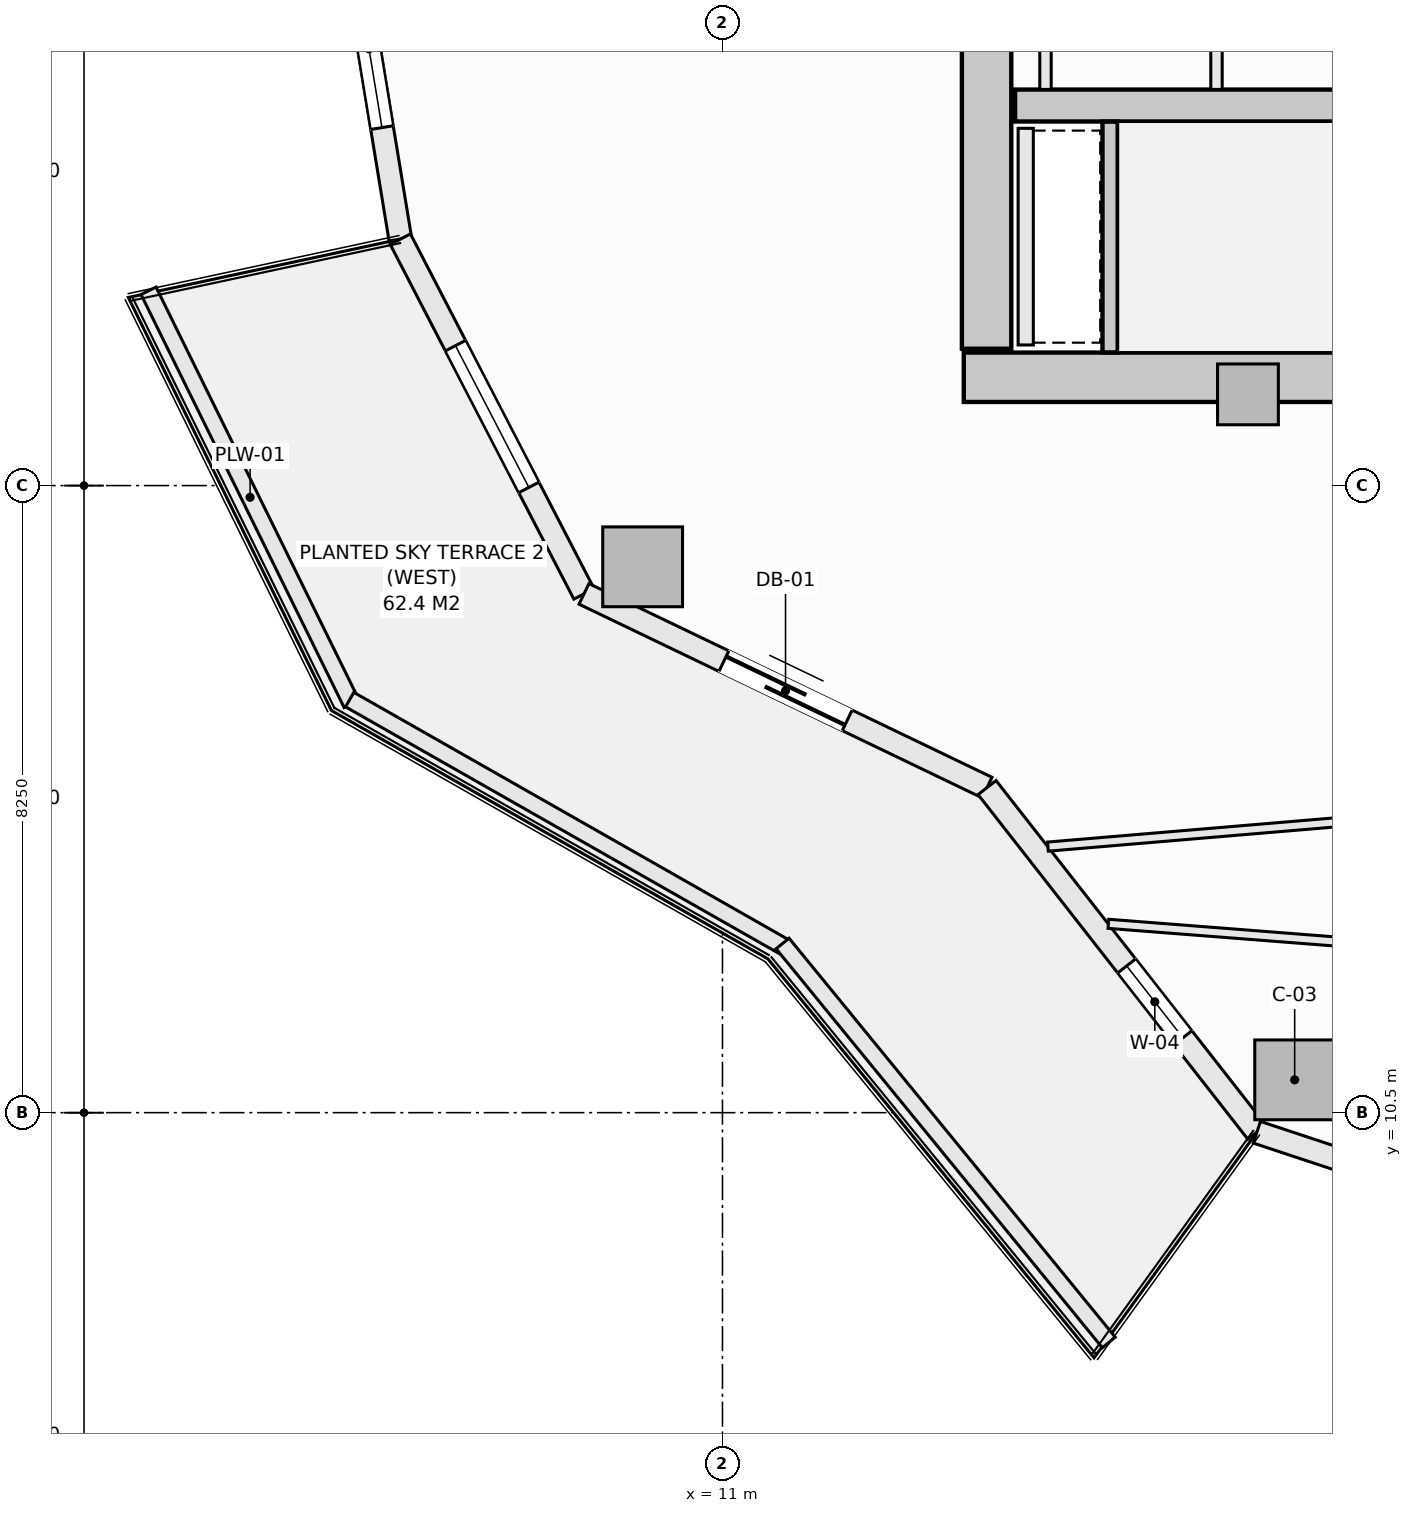
"""IFC4 building model, lengths in metres.
Left out: names, types, materials, properties, quantities, classifications, styles, units other than length and angle.
Written with IfcOpenShell. Run it as: python <this file> out.ifc"""

import sys

from ifc_helpers import new_model, si_unit, direction, frame, frame_2d, origin, origin_2d, place, context, subcontext, project, spatial, rectangle, extrude, element, fill, save


model = new_model("IFC4")
c1 = context("Model", 3, precision=1e-05, world=origin(), true_north=direction((0.0, 1.0)))
c2 = subcontext(c1, "Body", "Model", "MODEL_VIEW")
j1 = project(units=[si_unit("LENGTHUNIT", "METRE"), si_unit("PLANEANGLEUNIT", "RADIAN")], contexts=[c1])
p1 = place(None, origin())
s1 = spatial("IfcSite", under=j1, at=p1, CompositionType="ELEMENT")
p2 = place(p1, origin())
s2 = spatial("IfcBuilding", under=s1, at=p2, CompositionType="ELEMENT")
p3 = place(p2, frame((0.0, 0.0, 135.9)))
s3 = spatial("IfcBuildingStorey", under=s2, at=p3, CompositionType="ELEMENT", Elevation=135.9)
p4 = place(p3, frame((14.175, 20.175, -0.27), z_axis=(0.0, 0.0, 1.0), x_axis=(1.0, 0.0, 0.0)))
e1 = element("IfcWall", 1, at=p4, inside=s3, PredefinedType="SHEAR", context=c2, shape_type="SweptSolid", body=[
    extrude(rectangle(XDim=13.65, YDim=0.65, at=frame_2d((6.825, 0.0))), origin(), (0.0, 0.0, 1.0), 3.4),
])
p5 = place(p3, frame((14.475, 20.55, -0.27), z_axis=(0.0, 0.0, 1.0), x_axis=(0.0, 1.0, 0.0)))
e2 = element("IfcWall", 2, at=p5, inside=s3, PredefinedType="SHEAR", context=c2, shape_type="SweptSolid", body=[
    extrude(rectangle(XDim=12.9, YDim=0.65, at=frame_2d((6.45, 0.0))), origin(), (0.0, 0.0, 1.0), 3.4),
])
p6 = place(p3, frame((14.85, 23.75, -0.27), z_axis=(0.0, 0.0, 1.0), x_axis=(1.0, 0.0, 0.0)))
e3 = element("IfcWall", 3, at=p6, inside=s3, PredefinedType="SHEAR", context=c2, shape_type="SweptSolid", body=[
    extrude(rectangle(XDim=7.3, YDim=0.42, at=frame_2d((3.65, 0.0))), origin(), (0.0, 0.0, 1.0), 3.4),
])
for number, where, z_axis, x_axis in (
    (4, (9.95, 17.681, -0.27), (0.0, 0.0, 1.0), (1.0, 0.0, 0.0)),
    (5, (18.529, 10.932, -0.27), (0.0, 0.0, 1.0), (1.0, 0.0, 0.0)),
):
    element("IfcColumn", number, at=place(p3, frame(where, z_axis=z_axis, x_axis=x_axis)), inside=s3, PredefinedType="COLUMN", context=c2, shape_type="SweptSolid", body=[
        extrude(rectangle(XDim=1.05, YDim=1.05, at=origin_2d()), origin(), (0.0, 0.0, 1.0), 3.4),
    ])
p7 = place(p3, frame((17.914, 19.95, -0.27), z_axis=(0.0, 0.0, 1.0), x_axis=(1.0, 0.0, 0.0)))
e6 = element("IfcColumn", 6, at=p7, inside=s3, PredefinedType="PILASTER", context=c2, shape_type="SweptSolid", body=[
    extrude(rectangle(XDim=0.8, YDim=0.8, at=origin_2d()), origin(), (0.0, 0.0, 1.0), 3.4),
])
p8 = place(p3, frame((5.938, 27.0, 0.0), z_axis=(0.0, 0.0, 1.0), x_axis=(0.162393944769, -0.986726003864, 0.0)))
e7 = element("IfcWall", 7, at=p8, inside=s3, PredefinedType="SOLIDWALL", context=c2, shape_type="SweptSolid", body=[
    extrude(rectangle(XDim=5.075, YDim=0.3, at=frame_2d((2.538, 0.0))), origin(), (0.0, 0.0, 1.0), 2.653),
])
p9 = place(p8, frame((1.488, 0.0, 0.74)))
e8 = element("IfcOpeningElement", 8, at=p9, cuts=e7, PredefinedType="OPENING", context=c2, shape_type="SweptSolid", body=[
    extrude(rectangle(XDim=2.1, YDim=1.7, at=frame_2d((1.05, 0.85))), frame((0.0, 0.16, 0.0), z_axis=(0.0, -1.0, 0.0), x_axis=(1.0, 0.0, 0.0)), (0.0, 0.0, 1.0), 0.32),
])
p10 = place(p3, frame((6.762, 21.992, 0.0), z_axis=(0.0, 0.0, 1.0), x_axis=(0.459767899643, -0.888039119892, 0.0)))
e9 = element("IfcWall", 9, at=p10, inside=s3, PredefinedType="SOLIDWALL", context=c2, shape_type="SweptSolid", body=[
    extrude(rectangle(XDim=5.255, YDim=0.3, at=frame_2d((2.628, 0.0))), origin(), (0.0, 0.0, 1.0), 2.653),
])
p11 = place(p10, frame((1.578, 0.0, 0.74)))
e10 = element("IfcOpeningElement", 10, at=p11, cuts=e9, PredefinedType="OPENING", context=c2, shape_type="SweptSolid", body=[
    extrude(rectangle(XDim=2.1, YDim=1.7, at=frame_2d((1.05, 0.85))), frame((0.0, 0.16, 0.0), z_axis=(0.0, -1.0, 0.0), x_axis=(1.0, 0.0, 0.0)), (0.0, 0.0, 1.0), 0.32),
])
p12 = place(p3, frame((9.178, 17.325, 0.0), z_axis=(0.0, 0.0, 1.0), x_axis=(0.901370184739, -0.433049408339, 0.0)))
e11 = element("IfcWall", 11, at=p12, inside=s3, PredefinedType="SOLIDWALL", context=c2, shape_type="SweptSolid", body=[
    extrude(rectangle(XDim=5.884, YDim=0.3, at=frame_2d((2.942, 0.0))), origin(), (0.0, 0.0, 1.0), 2.653),
])
p13 = place(p12, frame((2.042, 0.0, 0.0)))
e12 = element("IfcOpeningElement", 12, at=p13, cuts=e11, PredefinedType="OPENING", context=c2, shape_type="SweptSolid", body=[
    extrude(rectangle(XDim=1.8, YDim=2.25, at=frame_2d((0.9, 1.125))), frame((0.0, 0.16, 0.0), z_axis=(0.0, -1.0, 0.0), x_axis=(1.0, 0.0, 0.0)), (0.0, 0.0, 1.0), 0.32),
])
p14 = place(p3, frame((14.481, 14.777, 0.0), z_axis=(0.0, 0.0, 1.0), x_axis=(0.616435134162, -0.787405693001, 0.0)))
e13 = element("IfcWall", 13, at=p14, inside=s3, PredefinedType="SOLIDWALL", context=c2, shape_type="SweptSolid", body=[
    extrude(rectangle(XDim=5.759, YDim=0.3, at=frame_2d((2.879, 0.0))), origin(), (0.0, 0.0, 1.0), 2.653),
])
p15 = place(p14, frame((2.98, 0.0, 0.72)))
e14 = element("IfcOpeningElement", 14, at=p15, cuts=e13, PredefinedType="OPENING", context=c2, shape_type="SweptSolid", body=[
    extrude(rectangle(XDim=1.2, YDim=1.65, at=frame_2d((0.6, 0.825))), frame((0.0, 0.16, 0.0), z_axis=(0.0, -1.0, 0.0), x_axis=(1.0, 0.0, 0.0)), (0.0, 0.0, 1.0), 0.32),
])
p16 = place(p3, frame((18.031, 10.242, 0.0), z_axis=(0.0, 0.0, 1.0), x_axis=(0.949238009374, -0.314558741032, 0.0)))
e15 = element("IfcWall", 15, at=p16, inside=s3, PredefinedType="SOLIDWALL", context=c2, shape_type="SweptSolid", body=[
    extrude(rectangle(XDim=6.146, YDim=0.3, at=frame_2d((3.073, 0.0))), origin(), (0.0, 0.0, 1.0), 2.653),
])
p17 = place(p16, frame((2.023, 0.0, 0.74)))
e16 = element("IfcOpeningElement", 16, at=p17, cuts=e15, PredefinedType="OPENING", context=c2, shape_type="SweptSolid", body=[
    extrude(rectangle(XDim=2.1, YDim=1.7, at=frame_2d((1.05, 0.85))), frame((0.0, 0.16, 0.0), z_axis=(0.0, -1.0, 0.0), x_axis=(1.0, 0.0, 0.0)), (0.0, 0.0, 1.0), 0.32),
])
p18 = place(p3, frame((3.449, 21.313, 0.0), z_axis=(0.0, 0.0, 1.0), x_axis=(0.441269631716, -0.897374566235, 0.0)))
e17 = element("IfcWall", 17, at=p18, inside=s3, PredefinedType="PARAPET", context=c2, shape_type="SweptSolid", body=[
    extrude(rectangle(XDim=6.056, YDim=0.22, at=frame_2d((3.028, 0.0))), origin(), (0.0, 0.0, 1.0), 0.52),
])
p19 = place(p3, frame((6.095, 15.934, 0.0), z_axis=(0.0, 0.0, 1.0), x_axis=(0.869187658335, -0.494482370361, 0.0)))
e18 = element("IfcWall", 18, at=p19, inside=s3, PredefinedType="PARAPET", context=c2, shape_type="SweptSolid", body=[
    extrude(rectangle(XDim=6.606, YDim=0.22, at=frame_2d((3.303, 0.0))), origin(), (0.0, 0.0, 1.0), 0.52),
])
p20 = place(p3, frame((11.791, 12.726, 0.0), z_axis=(0.0, 0.0, 1.0), x_axis=(0.633002467947, -0.77414977593, 0.0)))
e19 = element("IfcWall", 19, at=p20, inside=s3, PredefinedType="PARAPET", context=c2, shape_type="SweptSolid", body=[
    extrude(rectangle(XDim=6.78, YDim=0.22, at=frame_2d((3.39, 0.0))), origin(), (0.0, 0.0, 1.0), 0.52),
])
p21 = place(p3, frame((16.1, 20.502, -0.27), z_axis=(0.0, 0.0, 1.0), x_axis=(0.0, 1.0, 0.0)))
e20 = element("IfcWall", 20, at=p21, inside=s3, PredefinedType="SHEAR", context=c2, shape_type="SweptSolid", body=[
    extrude(rectangle(XDim=3.036, YDim=0.2, at=frame_2d((1.518, 0.0))), origin(), (0.0, 0.0, 1.0), 3.4),
])
p22 = place(p3, frame((14.99, 20.6, 0.0), z_axis=(0.0, 0.0, 1.0), x_axis=(0.0, 1.0, 0.0)))
e21 = element("IfcWall", 21, at=p22, inside=s3, PredefinedType="SOLIDWALL", context=c2, shape_type="SweptSolid", body=[
    extrude(rectangle(XDim=2.85, YDim=0.2, at=frame_2d((1.425, 0.0))), origin(), (0.0, 0.0, 1.0), 3.13),
])
for number, where, z_axis, x_axis in (
    (22, (15.25, 23.962, 0.0), (0.0, 0.0, 1.0), (0.0, 1.0, 0.0)),
    (23, (17.5, 23.962, 0.0), (0.0, 0.0, 1.0), (0.0, 1.0, 0.0)),
):
    element("IfcWall", number, at=place(p3, frame(where, z_axis=z_axis, x_axis=x_axis)), inside=s3, PredefinedType="PARTITIONING", context=c2, shape_type="SweptSolid", body=[
        extrude(rectangle(XDim=2.106, YDim=0.15, at=frame_2d((1.053, 0.0))), origin(), (0.0, 0.0, 1.0), 3.13),
    ])
p23 = place(p3, frame((15.282, 14.0, 0.0), z_axis=(0.0, 0.0, 1.0), x_axis=(0.996466219822, 0.083994480498, 0.0)))
e24 = element("IfcWall", 24, at=p23, inside=s3, PredefinedType="PARTITIONING", context=c2, shape_type="SweptSolid", body=[
    extrude(rectangle(XDim=8.069, YDim=0.12, at=frame_2d((4.034, 0.0))), origin(), (0.0, 0.0, 1.0), 3.13),
])
p24 = place(p3, frame((16.078, 12.985, 0.0), z_axis=(0.0, 0.0, 1.0), x_axis=(0.996984897733, -0.077595835537, 0.0)))
e25 = element("IfcWall", 25, at=p24, inside=s3, PredefinedType="PARTITIONING", context=c2, shape_type="SweptSolid", body=[
    extrude(rectangle(XDim=11.043, YDim=0.12, at=frame_2d((5.522, 0.0))), origin(), (0.0, 0.0, 1.0), 2.653),
])
p25 = place(p9, origin())
e26 = element("IfcWindow", 26, at=p25, inside=s3, PartitioningType="SINGLE_PANEL", PredefinedType="WINDOW", context=c2, shape_type="SweptSolid", body=[
    extrude(rectangle(XDim=2.1, YDim=1.7, at=frame_2d((1.05, 0.85))), frame((0.0, 0.03, 0.0), z_axis=(0.0, -1.0, 0.0), x_axis=(1.0, 0.0, 0.0)), (0.0, 0.0, 1.0), 0.06),
])
fill(e8, e26)
p26 = place(p11, origin())
e27 = element("IfcWindow", 27, at=p26, inside=s3, PartitioningType="SINGLE_PANEL", PredefinedType="WINDOW", context=c2, shape_type="SweptSolid", body=[
    extrude(rectangle(XDim=2.1, YDim=1.7, at=frame_2d((1.05, 0.85))), frame((0.0, 0.03, 0.0), z_axis=(0.0, -1.0, 0.0), x_axis=(1.0, 0.0, 0.0)), (0.0, 0.0, 1.0), 0.06),
])
fill(e10, e27)
p27 = place(p13, frame((1.8, 0.0, 0.0), z_axis=(0.0, 0.0, 1.0), x_axis=(-1.0, 0.0, 0.0)))
e28 = element("IfcDoor", 28, at=p27, inside=s3, OperationType="SLIDING_TO_LEFT", PredefinedType="DOOR", context=c2, shape_type="SweptSolid", body=[
    extrude(rectangle(XDim=1.8, YDim=2.25, at=frame_2d((0.9, 1.125))), frame((0.0, 0.025, 0.0), z_axis=(0.0, -1.0, 0.0), x_axis=(1.0, 0.0, 0.0)), (0.0, 0.0, 1.0), 0.05),
])
fill(e12, e28)
p28 = place(p15, origin())
e29 = element("IfcWindow", 29, at=p28, inside=s3, PartitioningType="SINGLE_PANEL", PredefinedType="WINDOW", context=c2, shape_type="SweptSolid", body=[
    extrude(rectangle(XDim=1.2, YDim=1.65, at=frame_2d((0.6, 0.825))), frame((0.0, 0.03, 0.0), z_axis=(0.0, -1.0, 0.0), x_axis=(1.0, 0.0, 0.0)), (0.0, 0.0, 1.0), 0.06),
])
fill(e14, e29)
save(model, sys.argv[1])
